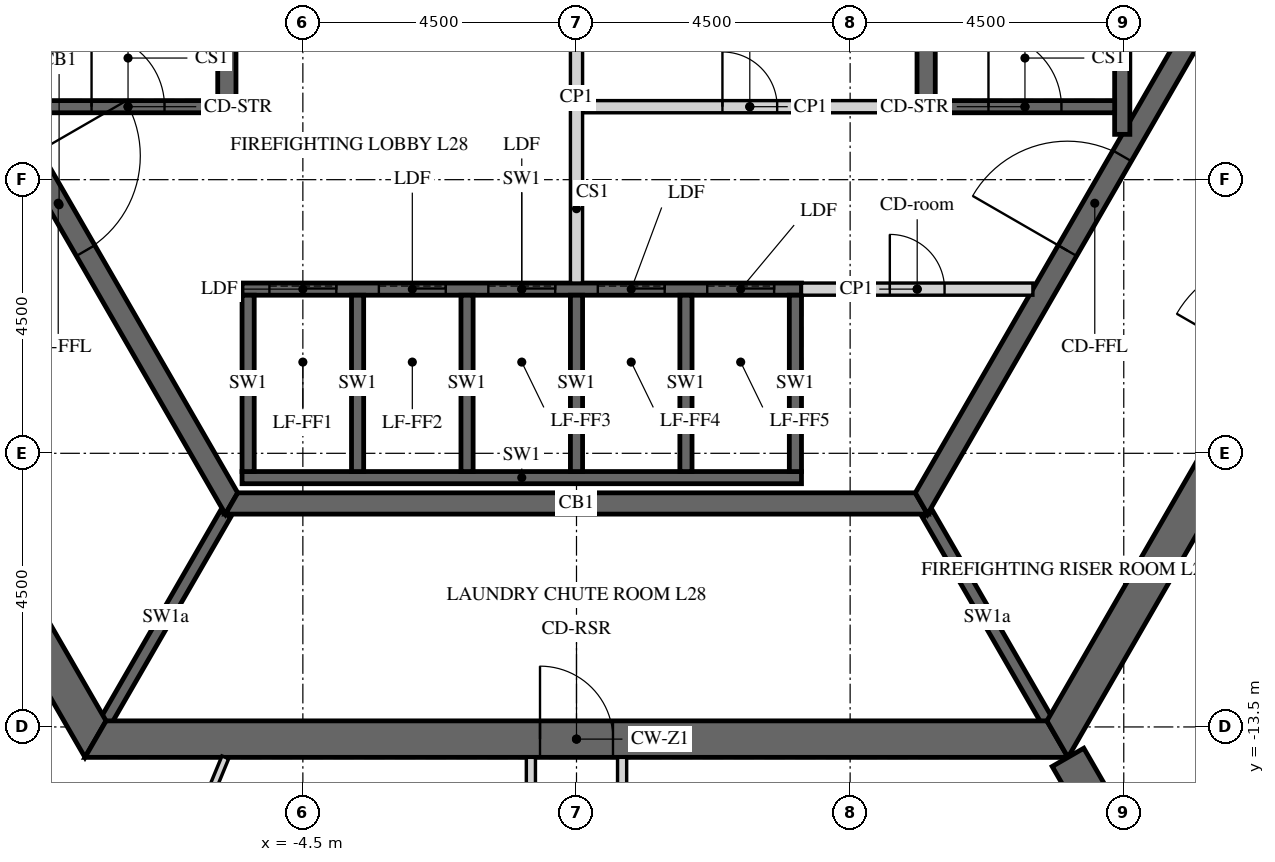
"""IFC4 building model, lengths in metres.
Left out: names, types, materials, properties, quantities, classifications, styles, units other than length and angle.
Written with IfcOpenShell. Run it as: python <this file> out.ifc"""

import sys

from ifc_helpers import new_model, si_unit, direction, frame, frame_2d, origin, place, context, subcontext, project, spatial, polyline, rectangle, outline, extrude, element, fill, save


model = new_model("IFC4")
c1 = context("Model", 3, precision=1e-05, world=origin(), true_north=direction((0.0, 1.0)))
c2 = subcontext(c1, "Body", "Model", "MODEL_VIEW")
j1 = project(units=[si_unit("LENGTHUNIT", "METRE"), si_unit("PLANEANGLEUNIT", "RADIAN")], contexts=[c1])
p1 = place(None, origin())
s1 = spatial("IfcSite", under=j1, at=p1, CompositionType="ELEMENT")
p2 = place(p1, origin())
s2 = spatial("IfcBuilding", under=s1, at=p2, CompositionType="ELEMENT")
p3 = place(p2, frame((0.0, 0.0, 123.3)))
s3 = spatial("IfcBuildingStorey", under=s2, at=p3, CompositionType="ELEMENT", Elevation=123.3)
p4 = place(p3, frame((-15.819, 0.0, -0.15), z_axis=(0.0, 0.0, 1.0), x_axis=(0.499999880136, -0.866025472988, 0.0)))
e1 = element("IfcWall", 1, at=p4, inside=s3, PredefinedType="SHEAR", context=c2, shape_type="SweptSolid", body=[
    extrude(outline(polyline([(-0.173, -0.3), (15.993, -0.3), (15.646, 0.3), (0.173, 0.3), (-0.173, -0.3)])), origin(), (0.0, 0.0, 1.0), 3.9),
])
p5 = place(p4, frame((6.981, 0.0, 0.15)))
e2 = element("IfcOpeningElement", 2, at=p5, cuts=e1, PredefinedType="OPENING", context=c2, shape_type="SweptSolid", body=[
    extrude(rectangle(XDim=1.8, YDim=2.4, at=frame_2d((0.9, 1.2))), frame((0.0, 0.31, 0.0), z_axis=(0.0, -1.0, 0.0), x_axis=(1.0, 0.0, 0.0)), (0.0, 0.0, 1.0), 0.62),
])
p6 = place(p3, frame((-7.91, -13.7, -0.15), z_axis=(0.0, 0.0, 1.0), x_axis=(1.0, 0.0, 0.0)))
e3 = element("IfcWall", 3, at=p6, inside=s3, PredefinedType="SHEAR", context=c2, shape_type="SweptSolid", body=[
    extrude(outline(polyline([(-0.173, -0.3), (15.993, -0.3), (15.646, 0.3), (0.173, 0.3), (-0.173, -0.3)])), origin(), (0.0, 0.0, 1.0), 3.9),
])
p7 = place(p6, frame((7.31, 0.0, 0.15)))
e4 = element("IfcOpeningElement", 4, at=p7, cuts=e3, PredefinedType="OPENING", context=c2, shape_type="SweptSolid", body=[
    extrude(rectangle(XDim=1.2, YDim=2.4, at=frame_2d((0.6, 1.2))), frame((0.0, 0.31, 0.0), z_axis=(0.0, -1.0, 0.0), x_axis=(1.0, 0.0, 0.0)), (0.0, 0.0, 1.0), 0.62),
])
p8 = place(p3, frame((7.91, -13.7, -0.15), z_axis=(0.0, 0.0, 1.0), x_axis=(0.499999880136, 0.866025472988, 0.0)))
e5 = element("IfcWall", 5, at=p8, inside=s3, PredefinedType="SHEAR", context=c2, shape_type="SweptSolid", body=[
    extrude(outline(polyline([(-0.173, -0.3), (15.993, -0.3), (15.646, 0.3), (0.173, 0.3), (-0.173, -0.3)])), origin(), (0.0, 0.0, 1.0), 3.9),
])
p9 = place(p8, frame((7.039, 0.0, 0.15)))
e6 = element("IfcOpeningElement", 6, at=p9, cuts=e5, PredefinedType="OPENING", context=c2, shape_type="SweptSolid", body=[
    extrude(rectangle(XDim=1.8, YDim=2.4, at=frame_2d((0.9, 1.2))), frame((0.0, 0.31, 0.0), z_axis=(0.0, -1.0, 0.0), x_axis=(1.0, 0.0, 0.0)), (0.0, 0.0, 1.0), 0.62),
])
p10 = place(p3, frame((8.083, -14.0, -0.15), z_axis=(0.0, 0.0, 1.0), x_axis=(0.499997680643, -0.866026742862, 0.0)))
e7 = element("IfcWall", 7, at=p10, inside=s3, PredefinedType="SHEAR", context=c2, shape_type="SweptSolid", body=[
    extrude(rectangle(XDim=16.509, YDim=0.6, at=frame_2d((8.254, 0.0))), origin(), (0.0, 0.0, 1.0), 3.9),
])
p11 = place(p10, frame((7.354, 0.0, 0.15)))
e8 = element("IfcOpeningElement", 8, at=p11, cuts=e7, PredefinedType="OPENING", context=c2, shape_type="SweptSolid", body=[
    extrude(rectangle(XDim=1.8, YDim=2.4, at=frame_2d((0.9, 1.2))), frame((0.0, 0.31, 0.0), z_axis=(0.0, -1.0, 0.0), x_axis=(1.0, 0.0, 0.0)), (0.0, 0.0, 1.0), 0.62),
])
p12 = place(p3, frame((-11.345, 0.0, -0.15), z_axis=(0.0, 0.0, 1.0), x_axis=(0.499995046907, -0.866028263435, 0.0)))
e9 = element("IfcWall", 9, at=p12, inside=s3, PredefinedType="SHEAR", context=c2, shape_type="SweptSolid", body=[
    extrude(outline(polyline([(-0.101, -0.175), (11.446, -0.175), (11.244, 0.175), (0.101, 0.175), (-0.101, -0.175)])), origin(), (0.0, 0.0, 1.0), 3.9),
])
p13 = place(p12, frame((4.744, 0.0, 0.15)))
e10 = element("IfcOpeningElement", 10, at=p13, cuts=e9, PredefinedType="OPENING", context=c2, shape_type="SweptSolid", body=[
    extrude(rectangle(XDim=1.8, YDim=2.4, at=frame_2d((0.9, 1.2))), frame((0.0, 0.185, 0.0), z_axis=(0.0, -1.0, 0.0), x_axis=(1.0, 0.0, 0.0)), (0.0, 0.0, 1.0), 0.37),
])
p14 = place(p3, frame((-5.673, -9.825, -0.15), z_axis=(0.0, 0.0, 1.0), x_axis=(1.0, 0.0, 0.0)))
e11 = element("IfcWall", 11, at=p14, inside=s3, PredefinedType="SHEAR", context=c2, shape_type="SweptSolid", body=[
    extrude(outline(polyline([(-0.101, -0.175), (11.446, -0.175), (11.244, 0.175), (0.101, 0.175), (-0.101, -0.175)])), origin(), (0.0, 0.0, 1.0), 3.9),
])
p15 = place(p3, frame((5.673, -9.825, -0.15), z_axis=(0.0, 0.0, 1.0), x_axis=(0.499995046907, 0.866028263435, 0.0)))
e12 = element("IfcWall", 12, at=p15, inside=s3, PredefinedType="SHEAR", context=c2, shape_type="SweptSolid", body=[
    extrude(outline(polyline([(-0.101, -0.175), (11.446, -0.175), (11.244, 0.175), (0.101, 0.175), (-0.101, -0.175)])), origin(), (0.0, 0.0, 1.0), 3.9),
])
p16 = place(p15, frame((4.801, 0.0, 0.15)))
e13 = element("IfcOpeningElement", 13, at=p16, cuts=e12, PredefinedType="OPENING", context=c2, shape_type="SweptSolid", body=[
    extrude(rectangle(XDim=1.8, YDim=2.4, at=frame_2d((0.9, 1.2))), frame((0.0, 0.185, 0.0), z_axis=(0.0, -1.0, 0.0), x_axis=(1.0, 0.0, 0.0)), (0.0, 0.0, 1.0), 0.37),
])
p17 = place(p3, frame((-5.5, -6.3, -0.25), z_axis=(0.0, 0.0, 1.0), x_axis=(1.0, 0.0, 0.0)))
e14 = element("IfcWall", 14, at=p17, inside=s3, PredefinedType="SHEAR", context=c2, shape_type="SweptSolid", body=[
    extrude(rectangle(XDim=9.2, YDim=0.2, at=frame_2d((4.6, 0.0))), origin(), (0.0, 0.0, 1.0), 3.9),
])
p18 = place(p17, frame((0.45, 0.0, 0.25)))
e15 = element("IfcOpeningElement", 15, at=p18, cuts=e14, PredefinedType="OPENING", context=c2, shape_type="SweptSolid", body=[
    extrude(rectangle(XDim=1.1, YDim=2.1, at=frame_2d((0.55, 1.05))), frame((0.0, 0.11, 0.0), z_axis=(0.0, -1.0, 0.0), x_axis=(1.0, 0.0, 0.0)), (0.0, 0.0, 1.0), 0.22),
])
p19 = place(p17, frame((2.25, 0.0, 0.25)))
e16 = element("IfcOpeningElement", 16, at=p19, cuts=e14, PredefinedType="OPENING", context=c2, shape_type="SweptSolid", body=[
    extrude(rectangle(XDim=1.1, YDim=2.1, at=frame_2d((0.55, 1.05))), frame((0.0, 0.11, 0.0), z_axis=(0.0, -1.0, 0.0), x_axis=(1.0, 0.0, 0.0)), (0.0, 0.0, 1.0), 0.22),
])
p20 = place(p17, frame((4.05, 0.0, 0.25)))
e17 = element("IfcOpeningElement", 17, at=p20, cuts=e14, PredefinedType="OPENING", context=c2, shape_type="SweptSolid", body=[
    extrude(rectangle(XDim=1.1, YDim=2.1, at=frame_2d((0.55, 1.05))), frame((0.0, 0.11, 0.0), z_axis=(0.0, -1.0, 0.0), x_axis=(1.0, 0.0, 0.0)), (0.0, 0.0, 1.0), 0.22),
])
p21 = place(p17, frame((5.85, 0.0, 0.25)))
e18 = element("IfcOpeningElement", 18, at=p21, cuts=e14, PredefinedType="OPENING", context=c2, shape_type="SweptSolid", body=[
    extrude(rectangle(XDim=1.1, YDim=2.1, at=frame_2d((0.55, 1.05))), frame((0.0, 0.11, 0.0), z_axis=(0.0, -1.0, 0.0), x_axis=(1.0, 0.0, 0.0)), (0.0, 0.0, 1.0), 0.22),
])
p22 = place(p17, frame((7.65, 0.0, 0.25)))
e19 = element("IfcOpeningElement", 19, at=p22, cuts=e14, PredefinedType="OPENING", context=c2, shape_type="SweptSolid", body=[
    extrude(rectangle(XDim=1.1, YDim=2.1, at=frame_2d((0.55, 1.05))), frame((0.0, 0.11, 0.0), z_axis=(0.0, -1.0, 0.0), x_axis=(1.0, 0.0, 0.0)), (0.0, 0.0, 1.0), 0.22),
])
p23 = place(p3, frame((-5.5, -9.4, -0.25), z_axis=(0.0, 0.0, 1.0), x_axis=(1.0, 0.0, 0.0)))
e20 = element("IfcWall", 20, at=p23, inside=s3, PredefinedType="SHEAR", context=c2, shape_type="SweptSolid", body=[
    extrude(rectangle(XDim=9.2, YDim=0.2, at=frame_2d((4.6, 0.0))), origin(), (0.0, 0.0, 1.0), 3.9),
])
for number, where, z_axis, x_axis in (
    (21, (-5.4, -9.3, -0.25), (0.0, 0.0, 1.0), (0.0, 1.0, 0.0)),
    (22, (-3.6, -9.3, -0.25), (0.0, 0.0, 1.0), (0.0, 1.0, 0.0)),
    (23, (-1.8, -9.3, -0.25), (0.0, 0.0, 1.0), (0.0, 1.0, 0.0)),
    (24, (0.0, -9.3, -0.25), (0.0, 0.0, 1.0), (0.0, 1.0, 0.0)),
    (25, (1.8, -9.3, -0.25), (0.0, 0.0, 1.0), (0.0, 1.0, 0.0)),
    (26, (3.6, -9.3, -0.25), (0.0, 0.0, 1.0), (0.0, 1.0, 0.0)),
):
    element("IfcWall", number, at=place(p3, frame(where, z_axis=z_axis, x_axis=x_axis)), inside=s3, PredefinedType="SHEAR", context=c2, shape_type="SweptSolid", body=[
        extrude(rectangle(XDim=2.9, YDim=0.2, at=frame_2d((1.45, 0.0))), origin(), (0.0, 0.0, 1.0), 3.9),
    ])
p24 = place(p3, frame((0.1, -3.3, 0.0), z_axis=(0.0, 0.0, 1.0), x_axis=(1.0, 0.0, 0.0)))
e27 = element("IfcWall", 27, at=p24, inside=s3, PredefinedType="PARTITIONING", context=c2, shape_type="SweptSolid", body=[
    extrude(rectangle(XDim=5.5, YDim=0.2, at=frame_2d((2.75, 0.0))), origin(), (0.0, 0.0, 1.0), 3.65),
])
p25 = place(p24, frame((2.3, 0.0, 0.0)))
e28 = element("IfcOpeningElement", 28, at=p25, cuts=e27, PredefinedType="OPENING", context=c2, shape_type="SweptSolid", body=[
    extrude(rectangle(XDim=0.9, YDim=2.1, at=frame_2d((0.45, 1.05))), frame((0.0, 0.11, 0.0), z_axis=(0.0, -1.0, 0.0), x_axis=(1.0, 0.0, 0.0)), (0.0, 0.0, 1.0), 0.22),
])
p26 = place(p3, frame((0.0, -6.2, 0.0), z_axis=(0.0, 0.0, 1.0), x_axis=(0.0, 1.0, 0.0)))
e29 = element("IfcWall", 29, at=p26, inside=s3, PredefinedType="PARTITIONING", context=c2, shape_type="SweptSolid", body=[
    extrude(rectangle(XDim=6.1, YDim=0.2, at=frame_2d((3.05, 0.0))), origin(), (0.0, 0.0, 1.0), 3.65),
])
p27 = place(p3, frame((3.7, -6.3, 0.0), z_axis=(0.0, 0.0, 1.0), x_axis=(1.0, 0.0, 0.0)))
e30 = element("IfcWall", 30, at=p27, inside=s3, PredefinedType="PARTITIONING", context=c2, shape_type="SweptSolid", body=[
    extrude(rectangle(XDim=3.806, YDim=0.2, at=frame_2d((1.903, 0.0))), origin(), (0.0, 0.0, 1.0), 3.65),
])
p28 = place(p27, frame((1.453, 0.0, 0.0)))
e31 = element("IfcOpeningElement", 31, at=p28, cuts=e30, PredefinedType="OPENING", context=c2, shape_type="SweptSolid", body=[
    extrude(rectangle(XDim=0.9, YDim=2.1, at=frame_2d((0.45, 1.05))), frame((0.0, 0.11, 0.0), z_axis=(0.0, -1.0, 0.0), x_axis=(1.0, 0.0, 0.0)), (0.0, 0.0, 1.0), 0.22),
])
for number, where, z_axis, x_axis in (
    (32, (-5.773, -10.0, -0.15), (0.0, 0.0, 1.0), (-0.5, -0.866, 0.0)),
    (33, (5.773, -10.0, -0.15), (0.0, 0.0, 1.0), (0.5, -0.866, 0.0)),
):
    element("IfcWall", number, at=place(p3, frame(where, z_axis=z_axis, x_axis=x_axis)), inside=s3, PredefinedType="SHEAR", context=c2, shape_type="SweptSolid", body=[
        extrude(rectangle(XDim=3.926, YDim=0.2, at=frame_2d((1.963, 0.0))), origin(), (0.0, 0.0, 1.0), 3.9),
    ])
p29 = place(p3, frame((5.75, -3.4, -0.25), z_axis=(0.0, 0.0, 1.0), x_axis=(0.0, 1.0, 0.0)))
e34 = element("IfcWall", 34, at=p29, inside=s3, PredefinedType="SHEAR", context=c2, shape_type="SweptSolid", body=[
    extrude(rectangle(XDim=6.8, YDim=0.3, at=frame_2d((3.4, 0.0))), origin(), (0.0, 0.0, 1.0), 3.9),
])
p30 = place(p3, frame((8.975, -3.755, -0.25), z_axis=(0.0, 0.0, 1.0), x_axis=(0.0, 1.0, 0.0)))
e35 = element("IfcWall", 35, at=p30, inside=s3, PredefinedType="SHEAR", context=c2, shape_type="SweptSolid", body=[
    extrude(rectangle(XDim=7.51, YDim=0.25, at=frame_2d((3.755, 0.0))), origin(), (0.0, 0.0, 1.0), 3.9),
])
p31 = place(p3, frame((5.9, -3.3, -0.25), z_axis=(0.0, 0.0, 1.0), x_axis=(1.0, 0.0, 0.0)))
e36 = element("IfcWall", 36, at=p31, inside=s3, PredefinedType="SHEAR", context=c2, shape_type="SweptSolid", body=[
    extrude(rectangle(XDim=2.95, YDim=0.2, at=frame_2d((1.475, 0.0))), origin(), (0.0, 0.0, 1.0), 3.9),
])
p32 = place(p31, frame((0.875, 0.0, 0.25)))
e37 = element("IfcOpeningElement", 37, at=p32, cuts=e36, PredefinedType="OPENING", context=c2, shape_type="SweptSolid", body=[
    extrude(rectangle(XDim=1.2, YDim=2.4, at=frame_2d((0.6, 1.2))), frame((0.0, 0.11, 0.0), z_axis=(0.0, -1.0, 0.0), x_axis=(1.0, 0.0, 0.0)), (0.0, 0.0, 1.0), 0.22),
])
p33 = place(p3, frame((-5.75, -3.4, -0.25), z_axis=(0.0, 0.0, 1.0), x_axis=(0.0, 1.0, 0.0)))
e38 = element("IfcWall", 38, at=p33, inside=s3, PredefinedType="SHEAR", context=c2, shape_type="SweptSolid", body=[
    extrude(rectangle(XDim=6.8, YDim=0.3, at=frame_2d((3.4, 0.0))), origin(), (0.0, 0.0, 1.0), 3.9),
])
p34 = place(p3, frame((-8.85, -3.3, -0.25), z_axis=(0.0, 0.0, 1.0), x_axis=(1.0, 0.0, 0.0)))
e39 = element("IfcWall", 39, at=p34, inside=s3, PredefinedType="SHEAR", context=c2, shape_type="SweptSolid", body=[
    extrude(rectangle(XDim=2.95, YDim=0.2, at=frame_2d((1.475, 0.0))), origin(), (0.0, 0.0, 1.0), 3.9),
])
p35 = place(p34, frame((0.875, 0.0, 0.25)))
e40 = element("IfcOpeningElement", 40, at=p35, cuts=e39, PredefinedType="OPENING", context=c2, shape_type="SweptSolid", body=[
    extrude(rectangle(XDim=1.2, YDim=2.4, at=frame_2d((0.6, 1.2))), frame((0.0, 0.11, 0.0), z_axis=(0.0, -1.0, 0.0), x_axis=(1.0, 0.0, 0.0)), (0.0, 0.0, 1.0), 0.22),
])
p36 = place(p3, frame((-0.75, -14.0, 0.0), z_axis=(0.0, 0.0, 1.0), x_axis=(0.0, -1.0, 0.0)))
e41 = element("IfcWall", 41, at=p36, inside=s3, PredefinedType="PARTITIONING", context=c2, shape_type="SweptSolid", body=[
    extrude(rectangle(XDim=6.252, YDim=0.15, at=frame_2d((3.126, 0.0))), origin(), (0.0, 0.0, 1.0), 2.988),
])
p37 = place(p3, frame((0.75, -20.072, 0.0), z_axis=(0.0, 0.0, 1.0), x_axis=(0.0, 1.0, 0.0)))
e42 = element("IfcWall", 42, at=p37, inside=s3, PredefinedType="PARTITIONING", context=c2, shape_type="SweptSolid", body=[
    extrude(rectangle(XDim=6.072, YDim=0.15, at=frame_2d((3.036, 0.0))), origin(), (0.0, 0.0, 1.0), 2.988),
])
p38 = place(p3, frame((-5.775, -14.0, 0.0), z_axis=(0.0, 0.0, 1.0), x_axis=(-0.381361051417, -0.924426172532, 0.0)))
e43 = element("IfcWall", 43, at=p38, inside=s3, PredefinedType="PARTITIONING", context=c2, shape_type="SweptSolid", body=[
    extrude(rectangle(XDim=7.271, YDim=0.12, at=frame_2d((3.636, 0.0))), origin(), (0.0, 0.0, 1.0), 2.988),
])
p39 = place(p7, origin())
e44 = element("IfcDoor", 44, at=p39, inside=s3, OperationType="SINGLE_SWING_LEFT", PredefinedType="DOOR", context=c2, shape_type="SweptSolid", body=[
    extrude(rectangle(XDim=1.2, YDim=2.4, at=frame_2d((0.6, 1.2))), frame((0.0, 0.025, 0.0), z_axis=(0.0, -1.0, 0.0), x_axis=(1.0, 0.0, 0.0)), (0.0, 0.0, 1.0), 0.05),
])
fill(e4, e44)
p40 = place(p13, origin())
e45 = element("IfcDoor", 45, at=p40, inside=s3, OperationType="DOUBLE_DOOR_SINGLE_SWING", PredefinedType="DOOR", context=c2, shape_type="SweptSolid", body=[
    extrude(rectangle(XDim=1.8, YDim=2.4, at=frame_2d((0.9, 1.2))), frame((0.0, 0.025, 0.0), z_axis=(0.0, -1.0, 0.0), x_axis=(1.0, 0.0, 0.0)), (0.0, 0.0, 1.0), 0.05),
])
fill(e10, e45)
p41 = place(p16, origin())
e46 = element("IfcDoor", 46, at=p41, inside=s3, OperationType="DOUBLE_DOOR_SINGLE_SWING", PredefinedType="DOOR", context=c2, shape_type="SweptSolid", body=[
    extrude(rectangle(XDim=1.8, YDim=2.4, at=frame_2d((0.9, 1.2))), frame((0.0, 0.025, 0.0), z_axis=(0.0, -1.0, 0.0), x_axis=(1.0, 0.0, 0.0)), (0.0, 0.0, 1.0), 0.05),
])
fill(e13, e46)
p42 = place(p25, origin())
e47 = element("IfcDoor", 47, at=p42, inside=s3, OperationType="SINGLE_SWING_LEFT", PredefinedType="DOOR", context=c2, shape_type="SweptSolid", body=[
    extrude(rectangle(XDim=0.9, YDim=2.1, at=frame_2d((0.45, 1.05))), frame((0.0, 0.025, 0.0), z_axis=(0.0, -1.0, 0.0), x_axis=(1.0, 0.0, 0.0)), (0.0, 0.0, 1.0), 0.05),
])
fill(e28, e47)
p43 = place(p28, origin())
e48 = element("IfcDoor", 48, at=p43, inside=s3, OperationType="SINGLE_SWING_LEFT", PredefinedType="DOOR", context=c2, shape_type="SweptSolid", body=[
    extrude(rectangle(XDim=0.9, YDim=2.1, at=frame_2d((0.45, 1.05))), frame((0.0, 0.025, 0.0), z_axis=(0.0, -1.0, 0.0), x_axis=(1.0, 0.0, 0.0)), (0.0, 0.0, 1.0), 0.05),
])
fill(e31, e48)
p44 = place(p32, origin())
e49 = element("IfcDoor", 49, at=p44, inside=s3, OperationType="SINGLE_SWING_LEFT", PredefinedType="DOOR", context=c2, shape_type="SweptSolid", body=[
    extrude(rectangle(XDim=1.2, YDim=2.4, at=frame_2d((0.6, 1.2))), frame((0.0, 0.025, 0.0), z_axis=(0.0, -1.0, 0.0), x_axis=(1.0, 0.0, 0.0)), (0.0, 0.0, 1.0), 0.05),
])
fill(e37, e49)
p45 = place(p35, origin())
e50 = element("IfcDoor", 50, at=p45, inside=s3, OperationType="SINGLE_SWING_LEFT", PredefinedType="DOOR", context=c2, shape_type="SweptSolid", body=[
    extrude(rectangle(XDim=1.2, YDim=2.4, at=frame_2d((0.6, 1.2))), frame((0.0, 0.025, 0.0), z_axis=(0.0, -1.0, 0.0), x_axis=(1.0, 0.0, 0.0)), (0.0, 0.0, 1.0), 0.05),
])
fill(e40, e50)
p46 = place(p18, origin())
e51 = element("IfcDoor", 51, at=p46, inside=s3, OperationType="SLIDING_TO_LEFT", PredefinedType="DOOR", context=c2, shape_type="SweptSolid", body=[
    extrude(rectangle(XDim=1.1, YDim=2.1, at=frame_2d((0.55, 1.05))), frame((0.0, 0.025, 0.0), z_axis=(0.0, -1.0, 0.0), x_axis=(1.0, 0.0, 0.0)), (0.0, 0.0, 1.0), 0.05),
])
fill(e15, e51)
p47 = place(p19, origin())
e52 = element("IfcDoor", 52, at=p47, inside=s3, OperationType="SLIDING_TO_LEFT", PredefinedType="DOOR", context=c2, shape_type="SweptSolid", body=[
    extrude(rectangle(XDim=1.1, YDim=2.1, at=frame_2d((0.55, 1.05))), frame((0.0, 0.025, 0.0), z_axis=(0.0, -1.0, 0.0), x_axis=(1.0, 0.0, 0.0)), (0.0, 0.0, 1.0), 0.05),
])
fill(e16, e52)
p48 = place(p20, origin())
e53 = element("IfcDoor", 53, at=p48, inside=s3, OperationType="SLIDING_TO_LEFT", PredefinedType="DOOR", context=c2, shape_type="SweptSolid", body=[
    extrude(rectangle(XDim=1.1, YDim=2.1, at=frame_2d((0.55, 1.05))), frame((0.0, 0.025, 0.0), z_axis=(0.0, -1.0, 0.0), x_axis=(1.0, 0.0, 0.0)), (0.0, 0.0, 1.0), 0.05),
])
fill(e17, e53)
p49 = place(p21, origin())
e54 = element("IfcDoor", 54, at=p49, inside=s3, OperationType="SLIDING_TO_LEFT", PredefinedType="DOOR", context=c2, shape_type="SweptSolid", body=[
    extrude(rectangle(XDim=1.1, YDim=2.1, at=frame_2d((0.55, 1.05))), frame((0.0, 0.025, 0.0), z_axis=(0.0, -1.0, 0.0), x_axis=(1.0, 0.0, 0.0)), (0.0, 0.0, 1.0), 0.05),
])
fill(e18, e54)
p50 = place(p22, origin())
e55 = element("IfcDoor", 55, at=p50, inside=s3, OperationType="SLIDING_TO_LEFT", PredefinedType="DOOR", context=c2, shape_type="SweptSolid", body=[
    extrude(rectangle(XDim=1.1, YDim=2.1, at=frame_2d((0.55, 1.05))), frame((0.0, 0.025, 0.0), z_axis=(0.0, -1.0, 0.0), x_axis=(1.0, 0.0, 0.0)), (0.0, 0.0, 1.0), 0.05),
])
fill(e19, e55)
save(model, sys.argv[1])
